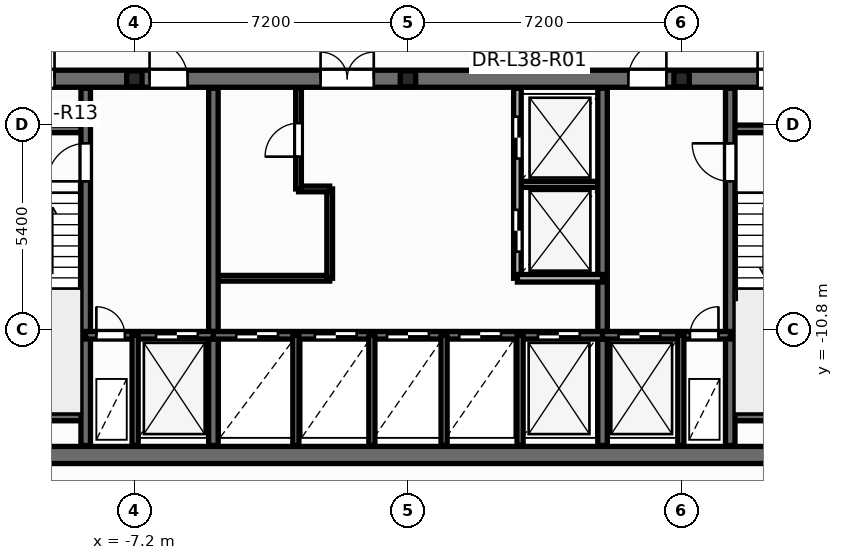
"""IFC4 building model, lengths in metres.
Left out: names, types, materials, properties, quantities, classifications, styles, units other than length and angle.
Written with IfcOpenShell. Run it as: python <this file> out.ifc"""

import sys

from ifc_helpers import new_model, si_unit, direction, frame, frame_2d, origin, origin_2d, place, context, subcontext, project, spatial, rectangle, i_section, extrude, element, fill, save


model = new_model("IFC4")
c1 = context("Model", 3, precision=1e-05, world=origin(), true_north=direction((0.0, 1.0)))
c2 = subcontext(c1, "Body", "Model", "MODEL_VIEW")
j1 = project(units=[si_unit("LENGTHUNIT", "METRE"), si_unit("PLANEANGLEUNIT", "RADIAN")], contexts=[c1])
p1 = place(None, origin())
s1 = spatial("IfcSite", under=j1, at=p1, CompositionType="ELEMENT")
p2 = place(p1, origin())
s2 = spatial("IfcBuilding", under=s1, at=p2, CompositionType="ELEMENT")
p3 = place(p2, frame((0.0, 0.0, 147.3)))
s3 = spatial("IfcBuildingStorey", under=s2, at=p3, CompositionType="ELEMENT", Elevation=147.3)
for number, where, z_axis, x_axis in (
    (1, (-7.2, -4.2, 0.0), (0.0, 0.0, 1.0), (1.0, 0.0, 0.0)),
    (2, (0.0, -4.2, 0.0), (0.0, 0.0, 1.0), (1.0, 0.0, 0.0)),
    (3, (7.2, -4.2, 0.0), (0.0, 0.0, 1.0), (1.0, 0.0, 0.0)),
):
    element("IfcColumn", number, at=place(p3, frame(where, z_axis=z_axis, x_axis=x_axis)), inside=s3, PredefinedType="PILASTER", context=c2, shape_type="SweptSolid", body=[
        extrude(i_section(OverallWidth=0.405, OverallDepth=0.414, WebThickness=0.022, FlangeThickness=0.032, at=origin_2d()), origin(), (0.0, 0.0, 1.0), 3.6),
    ])
p4 = place(p3, frame((-5.12, -9.45, 0.0), z_axis=(0.0, 0.0, 1.0), x_axis=(1.0, 0.0, 0.0)))
e4 = element("IfcWall", 4, at=p4, inside=s3, PredefinedType="PARTITIONING", context=c2, shape_type="SweptSolid", body=[
    extrude(rectangle(XDim=3.06, YDim=0.15, at=frame_2d((1.53, 0.0))), origin(), (0.0, 0.0, 1.0), 3.35),
])
p5 = place(p3, frame((-2.06, -9.45, 0.0), z_axis=(0.0, 0.0, 1.0), x_axis=(0.0, 1.0, 0.0)))
e5 = element("IfcWall", 5, at=p5, inside=s3, PredefinedType="PARTITIONING", context=c2, shape_type="SweptSolid", body=[
    extrude(rectangle(XDim=2.35, YDim=0.15, at=frame_2d((1.175, 0.0))), origin(), (0.0, 0.0, 1.0), 3.35),
])
p6 = place(p3, frame((-2.88, -7.1, 0.0), z_axis=(0.0, 0.0, 1.0), x_axis=(1.0, 0.0, 0.0)))
e6 = element("IfcWall", 6, at=p6, inside=s3, PredefinedType="PARTITIONING", context=c2, shape_type="SweptSolid", body=[
    extrude(rectangle(XDim=0.82, YDim=0.15, at=frame_2d((0.41, 0.0))), origin(), (0.0, 0.0, 1.0), 3.35),
])
p7 = place(p3, frame((-2.88, -7.1, 0.0), z_axis=(0.0, 0.0, 1.0), x_axis=(0.0, 1.0, 0.0)))
e7 = element("IfcWall", 7, at=p7, inside=s3, PredefinedType="PARTITIONING", context=c2, shape_type="SweptSolid", body=[
    extrude(rectangle(XDim=2.65, YDim=0.15, at=frame_2d((1.325, 0.0))), origin(), (0.0, 0.0, 1.0), 3.35),
])
p8 = place(p7, frame((0.85, 0.0, 0.0)))
e8 = element("IfcOpeningElement", 8, at=p8, cuts=e7, PredefinedType="OPENING", context=c2, shape_type="SweptSolid", body=[
    extrude(rectangle(XDim=0.886, YDim=2.104, at=frame_2d((0.44, 1.052))), frame((0.0, 0.085, 0.0), z_axis=(0.0, -1.0, 0.0), x_axis=(1.0, 0.0, 0.0)), (0.0, 0.0, 1.0), 0.17),
])
p9 = place(p3, frame((2.88, -6.98, 0.0), z_axis=(0.0, 0.0, 1.0), x_axis=(1.0, 0.0, 0.0)))
e9 = element("IfcWall", 9, at=p9, inside=s3, PredefinedType="PARTITIONING", context=c2, shape_type="SweptSolid", body=[
    extrude(rectangle(XDim=2.24, YDim=0.16, at=frame_2d((1.12, 0.0))), origin(), (0.0, 0.0, 1.0), 3.35),
])
p10 = place(p3, frame((-12.65, -14.1, 0.0), z_axis=(0.0, 0.0, 1.0), x_axis=(1.0, 0.0, 0.0)))
e10 = element("IfcWall", 10, at=p10, inside=s3, PredefinedType="SHEAR", context=c2, shape_type="SweptSolid", body=[
    extrude(rectangle(XDim=25.3, YDim=0.45, at=frame_2d((12.65, 0.0))), origin(), (0.0, 0.0, 1.0), 3.6),
])
p11 = place(p3, frame((-12.65, -4.2, 0.0), z_axis=(0.0, 0.0, 1.0), x_axis=(1.0, 0.0, 0.0)))
e11 = element("IfcWall", 11, at=p11, inside=s3, PredefinedType="SHEAR", context=c2, shape_type="SweptSolid", body=[
    extrude(rectangle(XDim=25.3, YDim=0.45, at=frame_2d((12.65, 0.0))), origin(), (0.0, 0.0, 1.0), 3.6),
])
p12 = place(p11, frame((0.95, 0.0, 0.0)))
e12 = element("IfcOpeningElement", 12, at=p12, cuts=e11, PredefinedType="OPENING", context=c2, shape_type="SweptSolid", body=[
    extrude(rectangle(XDim=0.756, YDim=2.054, at=frame_2d((0.375, 1.027))), frame((0.0, 0.235, 0.0), z_axis=(0.0, -1.0, 0.0), x_axis=(1.0, 0.0, 0.0)), (0.0, 0.0, 1.0), 0.47),
])
p13 = place(p11, frame((2.6, 0.0, 0.0)))
e13 = element("IfcOpeningElement", 13, at=p13, cuts=e11, PredefinedType="OPENING", context=c2, shape_type="SweptSolid", body=[
    extrude(rectangle(XDim=0.756, YDim=2.054, at=frame_2d((0.375, 1.027))), frame((0.0, 0.235, 0.0), z_axis=(0.0, -1.0, 0.0), x_axis=(1.0, 0.0, 0.0)), (0.0, 0.0, 1.0), 0.47),
])
p14 = place(p11, frame((21.85, 0.0, 0.0)))
e14 = element("IfcOpeningElement", 14, at=p14, cuts=e11, PredefinedType="OPENING", context=c2, shape_type="SweptSolid", body=[
    extrude(rectangle(XDim=0.756, YDim=2.054, at=frame_2d((0.375, 1.027))), frame((0.0, 0.235, 0.0), z_axis=(0.0, -1.0, 0.0), x_axis=(1.0, 0.0, 0.0)), (0.0, 0.0, 1.0), 0.47),
])
p15 = place(p11, frame((23.5, 0.0, 0.0)))
e15 = element("IfcOpeningElement", 15, at=p15, cuts=e11, PredefinedType="OPENING", context=c2, shape_type="SweptSolid", body=[
    extrude(rectangle(XDim=0.756, YDim=2.054, at=frame_2d((0.375, 1.027))), frame((0.0, 0.235, 0.0), z_axis=(0.0, -1.0, 0.0), x_axis=(1.0, 0.0, 0.0)), (0.0, 0.0, 1.0), 0.47),
])
p16 = place(p11, frame((5.85, 0.0, 0.0)))
e16 = element("IfcOpeningElement", 16, at=p16, cuts=e11, PredefinedType="OPENING", context=c2, shape_type="SweptSolid", body=[
    extrude(rectangle(XDim=1.006, YDim=2.104, at=frame_2d((0.5, 1.052))), frame((0.0, 0.235, 0.0), z_axis=(0.0, -1.0, 0.0), x_axis=(1.0, 0.0, 0.0)), (0.0, 0.0, 1.0), 0.47),
])
p17 = place(p11, frame((10.35, 0.0, 0.0)))
e17 = element("IfcOpeningElement", 17, at=p17, cuts=e11, PredefinedType="OPENING", context=c2, shape_type="SweptSolid", body=[
    extrude(rectangle(XDim=1.406, YDim=2.154, at=frame_2d((0.7, 1.077))), frame((0.0, 0.235, 0.0), z_axis=(0.0, -1.0, 0.0), x_axis=(1.0, 0.0, 0.0)), (0.0, 0.0, 1.0), 0.47),
])
p18 = place(p11, frame((18.45, 0.0, 0.0)))
e18 = element("IfcOpeningElement", 18, at=p18, cuts=e11, PredefinedType="OPENING", context=c2, shape_type="SweptSolid", body=[
    extrude(rectangle(XDim=1.006, YDim=2.104, at=frame_2d((0.5, 1.052))), frame((0.0, 0.235, 0.0), z_axis=(0.0, -1.0, 0.0), x_axis=(1.0, 0.0, 0.0)), (0.0, 0.0, 1.0), 0.47),
])
for number, where, z_axis, x_axis in (
    (19, (-12.35, -5.52, 0.0), (0.0, 0.0, 1.0), (1.0, 0.0, 0.0)),
    (20, (-12.35, -13.1, 0.0), (0.0, 0.0, 1.0), (1.0, 0.0, 0.0)),
    (21, (8.48, -5.52, 0.0), (0.0, 0.0, 1.0), (1.0, 0.0, 0.0)),
    (22, (8.48, -13.1, 0.0), (0.0, 0.0, 1.0), (1.0, 0.0, 0.0)),
):
    element("IfcWall", number, at=place(p3, frame(where, z_axis=z_axis, x_axis=x_axis)), inside=s3, PredefinedType="SOLIDWALL", context=c2, shape_type="SweptSolid", body=[
        extrude(rectangle(XDim=3.87, YDim=0.2, at=frame_2d((1.935, 0.0))), origin(), (0.0, 0.0, 1.0), 3.6),
    ])
p19 = place(p3, frame((-8.48, -13.85, 0.0), z_axis=(0.0, 0.0, 1.0), x_axis=(0.0, 1.0, 0.0)))
e23 = element("IfcWall", 23, at=p19, inside=s3, PredefinedType="SHEAR", context=c2, shape_type="SweptSolid", body=[
    extrude(rectangle(XDim=9.4, YDim=0.25, at=frame_2d((4.7, 0.0))), origin(), (0.0, 0.0, 1.0), 3.6),
])
p20 = place(p19, frame((6.95, 0.0, 0.0)))
e24 = element("IfcOpeningElement", 24, at=p20, cuts=e23, PredefinedType="OPENING", context=c2, shape_type="SweptSolid", body=[
    extrude(rectangle(XDim=1.006, YDim=2.104, at=frame_2d((0.5, 1.052))), frame((0.0, 0.135, 0.0), z_axis=(0.0, -1.0, 0.0), x_axis=(1.0, 0.0, 0.0)), (0.0, 0.0, 1.0), 0.27),
])
p21 = place(p3, frame((8.48, -13.85, 0.0), z_axis=(0.0, 0.0, 1.0), x_axis=(0.0, 1.0, 0.0)))
e25 = element("IfcWall", 25, at=p21, inside=s3, PredefinedType="SHEAR", context=c2, shape_type="SweptSolid", body=[
    extrude(rectangle(XDim=9.4, YDim=0.25, at=frame_2d((4.7, 0.0))), origin(), (0.0, 0.0, 1.0), 3.6),
])
p22 = place(p21, frame((6.95, 0.0, 0.0)))
e26 = element("IfcOpeningElement", 26, at=p22, cuts=e25, PredefinedType="OPENING", context=c2, shape_type="SweptSolid", body=[
    extrude(rectangle(XDim=1.006, YDim=2.104, at=frame_2d((0.5, 1.052))), frame((0.0, 0.135, 0.0), z_axis=(0.0, -1.0, 0.0), x_axis=(1.0, 0.0, 0.0)), (0.0, 0.0, 1.0), 0.27),
])
for number, where, z_axis, x_axis in (
    (27, (-5.12, -13.85, 0.0), (0.0, 0.0, 1.0), (0.0, 1.0, 0.0)),
    (28, (5.12, -13.85, 0.0), (0.0, 0.0, 1.0), (0.0, 1.0, 0.0)),
):
    element("IfcWall", number, at=place(p3, frame(where, z_axis=z_axis, x_axis=x_axis)), inside=s3, PredefinedType="SHEAR", context=c2, shape_type="SweptSolid", body=[
        extrude(rectangle(XDim=9.4, YDim=0.25, at=frame_2d((4.7, 0.0))), origin(), (0.0, 0.0, 1.0), 3.6),
    ])
p23 = place(p3, frame((-8.48, -10.95, 0.0), z_axis=(0.0, 0.0, 1.0), x_axis=(1.0, 0.0, 0.0)))
e29 = element("IfcWall", 29, at=p23, inside=s3, PredefinedType="SOLIDWALL", context=c2, shape_type="SweptSolid", body=[
    extrude(rectangle(XDim=3.36, YDim=0.2, at=frame_2d((1.68, 0.0))), origin(), (0.0, 0.0, 1.0), 3.6),
])
p24 = place(p23, frame((0.28, 0.0, 0.0)))
e30 = element("IfcOpeningElement", 30, at=p24, cuts=e29, PredefinedType="OPENING", context=c2, shape_type="SweptSolid", body=[
    extrude(rectangle(XDim=0.756, YDim=2.054, at=frame_2d((0.375, 1.027))), frame((0.0, 0.11, 0.0), z_axis=(0.0, -1.0, 0.0), x_axis=(1.0, 0.0, 0.0)), (0.0, 0.0, 1.0), 0.22),
])
p25 = place(p23, frame((1.85, 0.0, 0.0)))
e31 = element("IfcOpeningElement", 31, at=p25, cuts=e29, PredefinedType="OPENING", context=c2, shape_type="SweptSolid", body=[
    extrude(rectangle(XDim=1.106, YDim=2.104, at=frame_2d((0.55, 1.052))), frame((0.0, 0.11, 0.0), z_axis=(0.0, -1.0, 0.0), x_axis=(1.0, 0.0, 0.0)), (0.0, 0.0, 1.0), 0.22),
])
p26 = place(p3, frame((-5.12, -10.95, 0.0), z_axis=(0.0, 0.0, 1.0), x_axis=(1.0, 0.0, 0.0)))
e32 = element("IfcWall", 32, at=p26, inside=s3, PredefinedType="SOLIDWALL", context=c2, shape_type="SweptSolid", body=[
    extrude(rectangle(XDim=10.24, YDim=0.2, at=frame_2d((5.12, 0.0))), origin(), (0.0, 0.0, 1.0), 3.6),
])
p27 = place(p26, frame((0.6, 0.0, 0.0)))
e33 = element("IfcOpeningElement", 33, at=p27, cuts=e32, PredefinedType="OPENING", context=c2, shape_type="SweptSolid", body=[
    extrude(rectangle(XDim=1.106, YDim=2.104, at=frame_2d((0.55, 1.052))), frame((0.0, 0.11, 0.0), z_axis=(0.0, -1.0, 0.0), x_axis=(1.0, 0.0, 0.0)), (0.0, 0.0, 1.0), 0.22),
])
p28 = place(p26, frame((2.67, 0.0, 0.0)))
e34 = element("IfcOpeningElement", 34, at=p28, cuts=e32, PredefinedType="OPENING", context=c2, shape_type="SweptSolid", body=[
    extrude(rectangle(XDim=1.106, YDim=2.104, at=frame_2d((0.55, 1.052))), frame((0.0, 0.11, 0.0), z_axis=(0.0, -1.0, 0.0), x_axis=(1.0, 0.0, 0.0)), (0.0, 0.0, 1.0), 0.22),
])
p29 = place(p26, frame((4.57, 0.0, 0.0)))
e35 = element("IfcOpeningElement", 35, at=p29, cuts=e32, PredefinedType="OPENING", context=c2, shape_type="SweptSolid", body=[
    extrude(rectangle(XDim=1.106, YDim=2.104, at=frame_2d((0.55, 1.052))), frame((0.0, 0.11, 0.0), z_axis=(0.0, -1.0, 0.0), x_axis=(1.0, 0.0, 0.0)), (0.0, 0.0, 1.0), 0.22),
])
p30 = place(p26, frame((6.47, 0.0, 0.0)))
e36 = element("IfcOpeningElement", 36, at=p30, cuts=e32, PredefinedType="OPENING", context=c2, shape_type="SweptSolid", body=[
    extrude(rectangle(XDim=1.106, YDim=2.104, at=frame_2d((0.55, 1.052))), frame((0.0, 0.11, 0.0), z_axis=(0.0, -1.0, 0.0), x_axis=(1.0, 0.0, 0.0)), (0.0, 0.0, 1.0), 0.22),
])
p31 = place(p26, frame((8.54, 0.0, 0.0)))
e37 = element("IfcOpeningElement", 37, at=p31, cuts=e32, PredefinedType="OPENING", context=c2, shape_type="SweptSolid", body=[
    extrude(rectangle(XDim=1.106, YDim=2.104, at=frame_2d((0.55, 1.052))), frame((0.0, 0.11, 0.0), z_axis=(0.0, -1.0, 0.0), x_axis=(1.0, 0.0, 0.0)), (0.0, 0.0, 1.0), 0.22),
])
p32 = place(p3, frame((5.12, -10.95, 0.0), z_axis=(0.0, 0.0, 1.0), x_axis=(1.0, 0.0, 0.0)))
e38 = element("IfcWall", 38, at=p32, inside=s3, PredefinedType="SOLIDWALL", context=c2, shape_type="SweptSolid", body=[
    extrude(rectangle(XDim=3.36, YDim=0.2, at=frame_2d((1.68, 0.0))), origin(), (0.0, 0.0, 1.0), 3.6),
])
p33 = place(p32, frame((0.42, 0.0, 0.0)))
e39 = element("IfcOpeningElement", 39, at=p33, cuts=e38, PredefinedType="OPENING", context=c2, shape_type="SweptSolid", body=[
    extrude(rectangle(XDim=1.106, YDim=2.104, at=frame_2d((0.55, 1.052))), frame((0.0, 0.11, 0.0), z_axis=(0.0, -1.0, 0.0), x_axis=(1.0, 0.0, 0.0)), (0.0, 0.0, 1.0), 0.22),
])
p34 = place(p32, frame((2.3, 0.0, 0.0)))
e40 = element("IfcOpeningElement", 40, at=p34, cuts=e38, PredefinedType="OPENING", context=c2, shape_type="SweptSolid", body=[
    extrude(rectangle(XDim=0.756, YDim=2.054, at=frame_2d((0.375, 1.027))), frame((0.0, 0.11, 0.0), z_axis=(0.0, -1.0, 0.0), x_axis=(1.0, 0.0, 0.0)), (0.0, 0.0, 1.0), 0.22),
])
for number, where, z_axis, x_axis in (
    (41, (-7.18, -13.85, 0.0), (0.0, 0.0, 1.0), (0.0, 1.0, 0.0)),
    (42, (7.18, -13.85, 0.0), (0.0, 0.0, 1.0), (0.0, 1.0, 0.0)),
    (43, (-2.95, -13.85, 0.0), (0.0, 0.0, 1.0), (0.0, 1.0, 0.0)),
    (44, (2.95, -13.85, 0.0), (0.0, 0.0, 1.0), (0.0, 1.0, 0.0)),
):
    element("IfcWall", number, at=place(p3, frame(where, z_axis=z_axis, x_axis=x_axis)), inside=s3, PredefinedType="PARTITIONING", context=c2, shape_type="SweptSolid", body=[
        extrude(rectangle(XDim=2.9, YDim=0.16, at=frame_2d((1.45, 0.0))), origin(), (0.0, 0.0, 1.0), 2.475),
    ])
p35 = place(p3, frame((2.88, -9.45, 0.0), z_axis=(0.0, 0.0, 1.0), x_axis=(0.0, 1.0, 0.0)))
e45 = element("IfcWall", 45, at=p35, inside=s3, PredefinedType="SOLIDWALL", context=c2, shape_type="SweptSolid", body=[
    extrude(rectangle(XDim=5.0, YDim=0.2, at=frame_2d((2.5, 0.0))), origin(), (0.0, 0.0, 1.0), 3.35),
])
p36 = place(p35, frame((0.7, 0.0, 0.0)))
e46 = element("IfcOpeningElement", 46, at=p36, cuts=e45, PredefinedType="OPENING", context=c2, shape_type="SweptSolid", body=[
    extrude(rectangle(XDim=1.106, YDim=2.104, at=frame_2d((0.55, 1.052))), frame((0.0, 0.11, 0.0), z_axis=(0.0, -1.0, 0.0), x_axis=(1.0, 0.0, 0.0)), (0.0, 0.0, 1.0), 0.22),
])
p37 = place(p35, frame((3.15, 0.0, 0.0)))
e47 = element("IfcOpeningElement", 47, at=p37, cuts=e45, PredefinedType="OPENING", context=c2, shape_type="SweptSolid", body=[
    extrude(rectangle(XDim=1.106, YDim=2.104, at=frame_2d((0.55, 1.052))), frame((0.0, 0.11, 0.0), z_axis=(0.0, -1.0, 0.0), x_axis=(1.0, 0.0, 0.0)), (0.0, 0.0, 1.0), 0.22),
])
p38 = place(p3, frame((2.88, -9.45, 0.0), z_axis=(0.0, 0.0, 1.0), x_axis=(1.0, 0.0, 0.0)))
e48 = element("IfcWall", 48, at=p38, inside=s3, PredefinedType="SOLIDWALL", context=c2, shape_type="SweptSolid", body=[
    extrude(rectangle(XDim=2.24, YDim=0.2, at=frame_2d((1.12, 0.0))), origin(), (0.0, 0.0, 1.0), 3.35),
])
for number, where, z_axis, x_axis in (
    (49, (-0.95, -13.85, 0.0), (0.0, 0.0, 1.0), (0.0, 1.0, 0.0)),
    (50, (0.95, -13.85, 0.0), (0.0, 0.0, 1.0), (0.0, 1.0, 0.0)),
):
    element("IfcWall", number, at=place(p3, frame(where, z_axis=z_axis, x_axis=x_axis)), inside=s3, PredefinedType="PARTITIONING", context=c2, shape_type="SweptSolid", body=[
        extrude(rectangle(XDim=2.9, YDim=0.16, at=frame_2d((1.45, 0.0))), origin(), (0.0, 0.0, 1.0), 2.475),
    ])
p39 = place(p8, origin())
e51 = element("IfcDoor", 51, at=p39, inside=s3, OperationType="SINGLE_SWING_LEFT", PredefinedType="DOOR", context=c2, shape_type="SweptSolid", body=[
    extrude(rectangle(XDim=0.88, YDim=2.1, at=frame_2d((0.44, 1.05))), frame((0.0, 0.025, 0.0), z_axis=(0.0, -1.0, 0.0), x_axis=(1.0, 0.0, 0.0)), (0.0, 0.0, 1.0), 0.05),
])
fill(e8, e51)
p40 = place(p36, origin())
e52 = element("IfcDoor", 52, at=p40, inside=s3, OperationType="DOUBLE_DOOR_SLIDING", PredefinedType="DOOR", context=c2, shape_type="SweptSolid", body=[
    extrude(rectangle(XDim=1.1, YDim=2.1, at=frame_2d((0.55, 1.05))), frame((0.0, 0.025, 0.0), z_axis=(0.0, -1.0, 0.0), x_axis=(1.0, 0.0, 0.0)), (0.0, 0.0, 1.0), 0.05),
])
fill(e46, e52)
p41 = place(p37, origin())
e53 = element("IfcDoor", 53, at=p41, inside=s3, OperationType="DOUBLE_DOOR_SLIDING", PredefinedType="DOOR", context=c2, shape_type="SweptSolid", body=[
    extrude(rectangle(XDim=1.1, YDim=2.1, at=frame_2d((0.55, 1.05))), frame((0.0, 0.025, 0.0), z_axis=(0.0, -1.0, 0.0), x_axis=(1.0, 0.0, 0.0)), (0.0, 0.0, 1.0), 0.05),
])
fill(e47, e53)
p42 = place(p20, origin())
e54 = element("IfcDoor", 54, at=p42, inside=s3, OperationType="SINGLE_SWING_LEFT", PredefinedType="DOOR", context=c2, shape_type="SweptSolid", body=[
    extrude(rectangle(XDim=1.0, YDim=2.1, at=frame_2d((0.5, 1.05))), frame((0.0, 0.025, 0.0), z_axis=(0.0, -1.0, 0.0), x_axis=(1.0, 0.0, 0.0)), (0.0, 0.0, 1.0), 0.05),
])
fill(e24, e54)
p43 = place(p22, origin())
e55 = element("IfcDoor", 55, at=p43, inside=s3, OperationType="SINGLE_SWING_RIGHT", PredefinedType="DOOR", context=c2, shape_type="SweptSolid", body=[
    extrude(rectangle(XDim=1.0, YDim=2.1, at=frame_2d((0.5, 1.05))), frame((0.0, 0.025, 0.0), z_axis=(0.0, -1.0, 0.0), x_axis=(1.0, 0.0, 0.0)), (0.0, 0.0, 1.0), 0.05),
])
fill(e26, e55)
p44 = place(p24, origin())
e56 = element("IfcDoor", 56, at=p44, inside=s3, OperationType="SINGLE_SWING_LEFT", PredefinedType="DOOR", context=c2, shape_type="SweptSolid", body=[
    extrude(rectangle(XDim=0.75, YDim=2.05, at=frame_2d((0.375, 1.025))), frame((0.0, 0.025, 0.0), z_axis=(0.0, -1.0, 0.0), x_axis=(1.0, 0.0, 0.0)), (0.0, 0.0, 1.0), 0.05),
])
fill(e30, e56)
p45 = place(p25, origin())
e57 = element("IfcDoor", 57, at=p45, inside=s3, OperationType="DOUBLE_DOOR_SLIDING", PredefinedType="DOOR", context=c2, shape_type="SweptSolid", body=[
    extrude(rectangle(XDim=1.1, YDim=2.1, at=frame_2d((0.55, 1.05))), frame((0.0, 0.025, 0.0), z_axis=(0.0, -1.0, 0.0), x_axis=(1.0, 0.0, 0.0)), (0.0, 0.0, 1.0), 0.05),
])
fill(e31, e57)
p46 = place(p33, origin())
e58 = element("IfcDoor", 58, at=p46, inside=s3, OperationType="DOUBLE_DOOR_SLIDING", PredefinedType="DOOR", context=c2, shape_type="SweptSolid", body=[
    extrude(rectangle(XDim=1.1, YDim=2.1, at=frame_2d((0.55, 1.05))), frame((0.0, 0.025, 0.0), z_axis=(0.0, -1.0, 0.0), x_axis=(1.0, 0.0, 0.0)), (0.0, 0.0, 1.0), 0.05),
])
fill(e39, e58)
p47 = place(p34, origin())
e59 = element("IfcDoor", 59, at=p47, inside=s3, OperationType="SINGLE_SWING_RIGHT", PredefinedType="DOOR", context=c2, shape_type="SweptSolid", body=[
    extrude(rectangle(XDim=0.75, YDim=2.05, at=frame_2d((0.375, 1.025))), frame((0.0, 0.025, 0.0), z_axis=(0.0, -1.0, 0.0), x_axis=(1.0, 0.0, 0.0)), (0.0, 0.0, 1.0), 0.05),
])
fill(e40, e59)
p48 = place(p27, origin())
e60 = element("IfcDoor", 60, at=p48, inside=s3, OperationType="DOUBLE_DOOR_SLIDING", PredefinedType="DOOR", context=c2, shape_type="SweptSolid", body=[
    extrude(rectangle(XDim=1.1, YDim=2.1, at=frame_2d((0.55, 1.05))), frame((0.0, 0.025, 0.0), z_axis=(0.0, -1.0, 0.0), x_axis=(1.0, 0.0, 0.0)), (0.0, 0.0, 1.0), 0.05),
])
fill(e33, e60)
p49 = place(p28, origin())
e61 = element("IfcDoor", 61, at=p49, inside=s3, OperationType="DOUBLE_DOOR_SLIDING", PredefinedType="DOOR", context=c2, shape_type="SweptSolid", body=[
    extrude(rectangle(XDim=1.1, YDim=2.1, at=frame_2d((0.55, 1.05))), frame((0.0, 0.025, 0.0), z_axis=(0.0, -1.0, 0.0), x_axis=(1.0, 0.0, 0.0)), (0.0, 0.0, 1.0), 0.05),
])
fill(e34, e61)
p50 = place(p29, origin())
e62 = element("IfcDoor", 62, at=p50, inside=s3, OperationType="DOUBLE_DOOR_SLIDING", PredefinedType="DOOR", context=c2, shape_type="SweptSolid", body=[
    extrude(rectangle(XDim=1.1, YDim=2.1, at=frame_2d((0.55, 1.05))), frame((0.0, 0.025, 0.0), z_axis=(0.0, -1.0, 0.0), x_axis=(1.0, 0.0, 0.0)), (0.0, 0.0, 1.0), 0.05),
])
fill(e35, e62)
p51 = place(p30, origin())
e63 = element("IfcDoor", 63, at=p51, inside=s3, OperationType="DOUBLE_DOOR_SLIDING", PredefinedType="DOOR", context=c2, shape_type="SweptSolid", body=[
    extrude(rectangle(XDim=1.1, YDim=2.1, at=frame_2d((0.55, 1.05))), frame((0.0, 0.025, 0.0), z_axis=(0.0, -1.0, 0.0), x_axis=(1.0, 0.0, 0.0)), (0.0, 0.0, 1.0), 0.05),
])
fill(e36, e63)
p52 = place(p31, origin())
e64 = element("IfcDoor", 64, at=p52, inside=s3, OperationType="DOUBLE_DOOR_SLIDING", PredefinedType="DOOR", context=c2, shape_type="SweptSolid", body=[
    extrude(rectangle(XDim=1.1, YDim=2.1, at=frame_2d((0.55, 1.05))), frame((0.0, 0.025, 0.0), z_axis=(0.0, -1.0, 0.0), x_axis=(1.0, 0.0, 0.0)), (0.0, 0.0, 1.0), 0.05),
])
fill(e37, e64)
p53 = place(p13, origin())
e65 = element("IfcDoor", 65, at=p53, inside=s3, OperationType="SINGLE_SWING_RIGHT", PredefinedType="DOOR", context=c2, shape_type="SweptSolid", body=[
    extrude(rectangle(XDim=0.75, YDim=2.05, at=frame_2d((0.375, 1.025))), frame((0.0, 0.025, 0.0), z_axis=(0.0, -1.0, 0.0), x_axis=(1.0, 0.0, 0.0)), (0.0, 0.0, 1.0), 0.05),
])
fill(e13, e65)
p54 = place(p14, origin())
e66 = element("IfcDoor", 66, at=p54, inside=s3, OperationType="SINGLE_SWING_LEFT", PredefinedType="DOOR", context=c2, shape_type="SweptSolid", body=[
    extrude(rectangle(XDim=0.75, YDim=2.05, at=frame_2d((0.375, 1.025))), frame((0.0, 0.025, 0.0), z_axis=(0.0, -1.0, 0.0), x_axis=(1.0, 0.0, 0.0)), (0.0, 0.0, 1.0), 0.05),
])
fill(e14, e66)
p55 = place(p16, origin())
e67 = element("IfcDoor", 67, at=p55, inside=s3, OperationType="SINGLE_SWING_LEFT", PredefinedType="DOOR", context=c2, shape_type="SweptSolid", body=[
    extrude(rectangle(XDim=1.0, YDim=2.1, at=frame_2d((0.5, 1.05))), frame((0.0, 0.025, 0.0), z_axis=(0.0, -1.0, 0.0), x_axis=(1.0, 0.0, 0.0)), (0.0, 0.0, 1.0), 0.05),
])
fill(e16, e67)
p56 = place(p17, origin())
e68 = element("IfcDoor", 68, at=p56, inside=s3, OperationType="DOUBLE_DOOR_SINGLE_SWING", PredefinedType="DOOR", context=c2, shape_type="SweptSolid", body=[
    extrude(rectangle(XDim=1.4, YDim=2.15, at=frame_2d((0.7, 1.075))), frame((0.0, 0.025, 0.0), z_axis=(0.0, -1.0, 0.0), x_axis=(1.0, 0.0, 0.0)), (0.0, 0.0, 1.0), 0.05),
])
fill(e17, e68)
p57 = place(p18, origin())
e69 = element("IfcDoor", 69, at=p57, inside=s3, OperationType="SINGLE_SWING_RIGHT", PredefinedType="DOOR", context=c2, shape_type="SweptSolid", body=[
    extrude(rectangle(XDim=1.0, YDim=2.1, at=frame_2d((0.5, 1.05))), frame((0.0, 0.025, 0.0), z_axis=(0.0, -1.0, 0.0), x_axis=(1.0, 0.0, 0.0)), (0.0, 0.0, 1.0), 0.05),
])
fill(e18, e69)
save(model, sys.argv[1])
